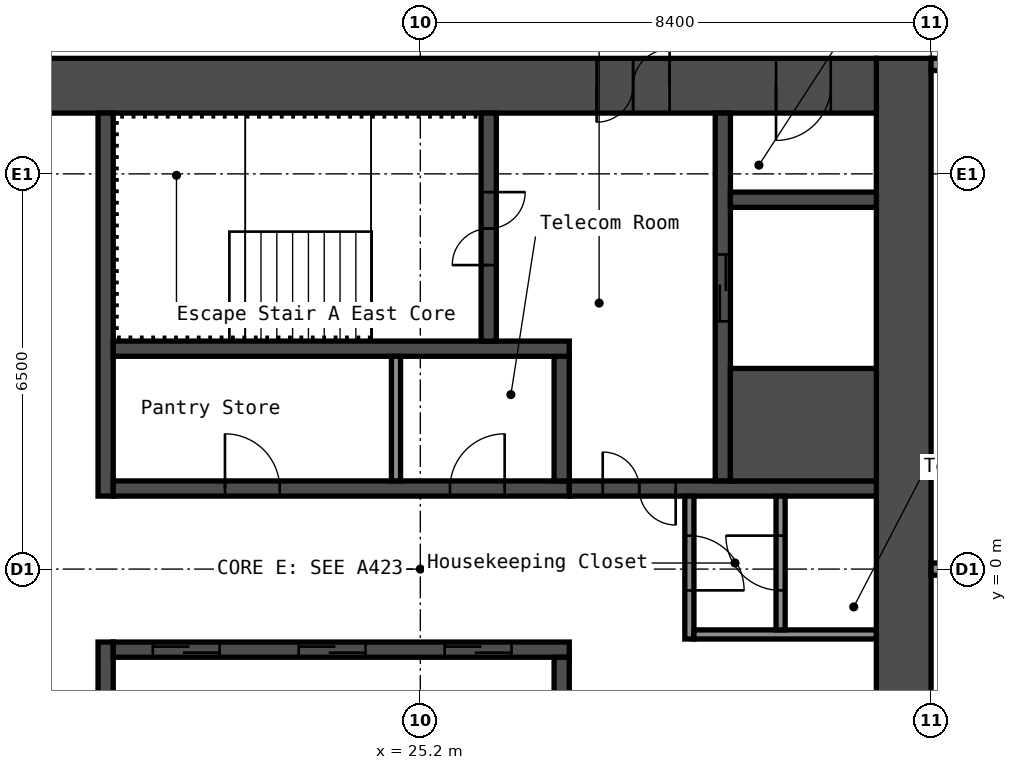
"""IFC4 building model, lengths in metres.
Left out: names, types, materials, properties, quantities, classifications, styles, units other than length and angle.
Written with IfcOpenShell. Run it as: python <this file> out.ifc"""

import sys

from ifc_helpers import new_model, si_unit, direction, frame, frame_2d, origin, place, context, subcontext, project, spatial, rectangle, extrude, element, fill, save


model = new_model("IFC4")
c1 = context("Model", 3, precision=1e-05, world=origin(), true_north=direction((0.0, 1.0)))
c2 = subcontext(c1, "Body", "Model", "MODEL_VIEW")
j1 = project(units=[si_unit("LENGTHUNIT", "METRE"), si_unit("PLANEANGLEUNIT", "RADIAN")], contexts=[c1])
p1 = place(None, origin())
s1 = spatial("IfcSite", under=j1, at=p1, CompositionType="ELEMENT")
p2 = place(p1, origin())
s2 = spatial("IfcBuilding", under=s1, at=p2, CompositionType="ELEMENT")
p3 = place(p2, frame((0.0, 0.0, 156.6)))
s3 = spatial("IfcBuildingStorey", under=s2, at=p3, CompositionType="ELEMENT", Elevation=156.6)
p4 = place(p3, frame((33.15, -8.4, 0.0), z_axis=(0.0, 0.0, 1.0), x_axis=(0.0, 1.0, 0.0)))
e1 = element("IfcWall", 1, at=p4, inside=s3, PredefinedType="SHEAR", context=c2, shape_type="SweptSolid", body=[
    extrude(rectangle(XDim=16.8, YDim=0.9, at=frame_2d((8.4, 0.0))), origin(), (0.0, 0.0, 1.0), 2.75),
])
p5 = place(p3, frame((17.7, 7.95, 0.0), z_axis=(0.0, 0.0, 1.0), x_axis=(1.0, 0.0, 0.0)))
e2 = element("IfcWall", 2, at=p5, inside=s3, PredefinedType="SHEAR", context=c2, shape_type="SweptSolid", body=[
    extrude(rectangle(XDim=15.0, YDim=0.9, at=frame_2d((7.5, 0.0))), origin(), (0.0, 0.0, 1.0), 2.75),
])
p6 = place(p5, frame((10.4, 0.0, 0.0)))
e3 = element("IfcOpeningElement", 3, at=p6, cuts=e2, PredefinedType="OPENING", context=c2, shape_type="SweptSolid", body=[
    extrude(rectangle(XDim=1.2, YDim=2.1, at=frame_2d((0.6, 1.05))), frame((0.0, 0.46, 0.0), z_axis=(0.0, -1.0, 0.0), x_axis=(1.0, 0.0, 0.0)), (0.0, 0.0, 1.0), 0.92),
])
p7 = place(p5, frame((13.35, 0.0, 0.0)))
e4 = element("IfcOpeningElement", 4, at=p7, cuts=e2, PredefinedType="OPENING", context=c2, shape_type="SweptSolid", body=[
    extrude(rectangle(XDim=0.9, YDim=2.1, at=frame_2d((0.45, 1.05))), frame((0.0, 0.46, 0.0), z_axis=(0.0, -1.0, 0.0), x_axis=(1.0, 0.0, 0.0)), (0.0, 0.0, 1.0), 0.92),
])
p8 = place(p3, frame((20.025, 1.2, 0.0), z_axis=(0.0, 0.0, 1.0), x_axis=(0.0, 1.0, 0.0)))
e5 = element("IfcWall", 5, at=p8, inside=s3, PredefinedType="SHEAR", context=c2, shape_type="SweptSolid", body=[
    extrude(rectangle(XDim=6.3, YDim=0.25, at=frame_2d((3.15, 0.0))), origin(), (0.0, 0.0, 1.0), 2.75),
])
p9 = place(p3, frame((20.025, -7.5, 0.0), z_axis=(0.0, 0.0, 1.0), x_axis=(0.0, 1.0, 0.0)))
e6 = element("IfcWall", 6, at=p9, inside=s3, PredefinedType="SHEAR", context=c2, shape_type="SweptSolid", body=[
    extrude(rectangle(XDim=6.3, YDim=0.25, at=frame_2d((3.15, 0.0))), origin(), (0.0, 0.0, 1.0), 2.75),
])
p10 = place(p9, frame((2.4, 0.0, 0.0)))
e7 = element("IfcOpeningElement", 7, at=p10, cuts=e6, PredefinedType="OPENING", context=c2, shape_type="SweptSolid", body=[
    extrude(rectangle(XDim=1.0, YDim=2.1, at=frame_2d((0.5, 1.05))), frame((0.0, 0.135, 0.0), z_axis=(0.0, -1.0, 0.0), x_axis=(1.0, 0.0, 0.0)), (0.0, 0.0, 1.0), 0.27),
])
p11 = place(p3, frame((20.15, 1.325, 0.0), z_axis=(0.0, 0.0, 1.0), x_axis=(1.0, 0.0, 0.0)))
e8 = element("IfcWall", 8, at=p11, inside=s3, PredefinedType="SHEAR", context=c2, shape_type="SweptSolid", body=[
    extrude(rectangle(XDim=7.5, YDim=0.25, at=frame_2d((3.75, 0.0))), origin(), (0.0, 0.0, 1.0), 2.75),
])
p12 = place(p11, frame((1.837, 0.0, 0.0)))
e9 = element("IfcOpeningElement", 9, at=p12, cuts=e8, PredefinedType="OPENING", context=c2, shape_type="SweptSolid", body=[
    extrude(rectangle(XDim=0.9, YDim=2.1, at=frame_2d((0.45, 1.05))), frame((0.0, 0.135, 0.0), z_axis=(0.0, -1.0, 0.0), x_axis=(1.0, 0.0, 0.0)), (0.0, 0.0, 1.0), 0.27),
])
p13 = place(p11, frame((5.538, 0.0, 0.0)))
e10 = element("IfcOpeningElement", 10, at=p13, cuts=e8, PredefinedType="OPENING", context=c2, shape_type="SweptSolid", body=[
    extrude(rectangle(XDim=0.9, YDim=2.1, at=frame_2d((0.45, 1.05))), frame((0.0, 0.135, 0.0), z_axis=(0.0, -1.0, 0.0), x_axis=(1.0, 0.0, 0.0)), (0.0, 0.0, 1.0), 0.27),
])
p14 = place(p3, frame((27.525, 1.45, 0.0), z_axis=(0.0, 0.0, 1.0), x_axis=(0.0, 1.0, 0.0)))
e11 = element("IfcWall", 11, at=p14, inside=s3, PredefinedType="SHEAR", context=c2, shape_type="SweptSolid", body=[
    extrude(rectangle(XDim=2.05, YDim=0.25, at=frame_2d((1.025, 0.0))), origin(), (0.0, 0.0, 1.0), 2.75),
])
p15 = place(p3, frame((20.15, 3.625, 0.0), z_axis=(0.0, 0.0, 1.0), x_axis=(1.0, 0.0, 0.0)))
e12 = element("IfcWall", 12, at=p15, inside=s3, PredefinedType="SHEAR", context=c2, shape_type="SweptSolid", body=[
    extrude(rectangle(XDim=7.5, YDim=0.25, at=frame_2d((3.75, 0.0))), origin(), (0.0, 0.0, 1.0), 2.75),
])
p16 = place(p3, frame((26.325, 3.75, 0.0), z_axis=(0.0, 0.0, 1.0), x_axis=(0.0, 1.0, 0.0)))
e13 = element("IfcWall", 13, at=p16, inside=s3, PredefinedType="SHEAR", context=c2, shape_type="SweptSolid", body=[
    extrude(rectangle(XDim=3.75, YDim=0.25, at=frame_2d((1.875, 0.0))), origin(), (0.0, 0.0, 1.0), 2.75),
])
p17 = place(p16, frame((1.25, 0.0, 0.0)))
e14 = element("IfcOpeningElement", 14, at=p17, cuts=e13, PredefinedType="OPENING", context=c2, shape_type="SweptSolid", body=[
    extrude(rectangle(XDim=1.2, YDim=2.1, at=frame_2d((0.6, 1.05))), frame((0.0, 0.135, 0.0), z_axis=(0.0, -1.0, 0.0), x_axis=(1.0, 0.0, 0.0)), (0.0, 0.0, 1.0), 0.27),
])
p18 = place(p3, frame((27.65, 1.325, 0.0), z_axis=(0.0, 0.0, 1.0), x_axis=(1.0, 0.0, 0.0)))
e15 = element("IfcWall", 15, at=p18, inside=s3, PredefinedType="SHEAR", context=c2, shape_type="SweptSolid", body=[
    extrude(rectangle(XDim=5.05, YDim=0.25, at=frame_2d((2.525, 0.0))), origin(), (0.0, 0.0, 1.0), 2.75),
])
p19 = place(p18, frame((0.55, 0.0, 0.0)))
e16 = element("IfcOpeningElement", 16, at=p19, cuts=e15, PredefinedType="OPENING", context=c2, shape_type="SweptSolid", body=[
    extrude(rectangle(XDim=1.2, YDim=2.1, at=frame_2d((0.6, 1.05))), frame((0.0, 0.135, 0.0), z_axis=(0.0, -1.0, 0.0), x_axis=(1.0, 0.0, 0.0)), (0.0, 0.0, 1.0), 0.27),
])
p20 = place(p3, frame((30.175, 1.45, 0.0), z_axis=(0.0, 0.0, 1.0), x_axis=(0.0, 1.0, 0.0)))
e17 = element("IfcWall", 17, at=p20, inside=s3, PredefinedType="SHEAR", context=c2, shape_type="SweptSolid", body=[
    extrude(rectangle(XDim=6.05, YDim=0.25, at=frame_2d((3.025, 0.0))), origin(), (0.0, 0.0, 1.0), 2.75),
])
p21 = place(p20, frame((2.625, 0.0, 0.0)))
e18 = element("IfcOpeningElement", 18, at=p21, cuts=e17, PredefinedType="OPENING", context=c2, shape_type="SweptSolid", body=[
    extrude(rectangle(XDim=1.1, YDim=2.1, at=frame_2d((0.55, 1.05))), frame((0.0, 0.135, 0.0), z_axis=(0.0, -1.0, 0.0), x_axis=(1.0, 0.0, 0.0)), (0.0, 0.0, 1.0), 0.27),
])
p22 = place(p3, frame((30.3, 2.375, 0.0), z_axis=(0.0, 0.0, 1.0), x_axis=(1.0, 0.0, 0.0)))
e19 = element("IfcWall", 19, at=p22, inside=s3, PredefinedType="SHEAR", context=c2, shape_type="SweptSolid", body=[
    extrude(rectangle(XDim=2.4, YDim=1.85, at=frame_2d((1.2, 0.0))), origin(), (0.0, 0.0, 1.0), 2.75),
])
p23 = place(p3, frame((30.3, 6.075, 0.0), z_axis=(0.0, 0.0, 1.0), x_axis=(1.0, 0.0, 0.0)))
e20 = element("IfcWall", 20, at=p23, inside=s3, PredefinedType="SHEAR", context=c2, shape_type="SweptSolid", body=[
    extrude(rectangle(XDim=2.4, YDim=0.25, at=frame_2d((1.2, 0.0))), origin(), (0.0, 0.0, 1.0), 2.75),
])
p24 = place(p3, frame((20.15, -1.325, 0.0), z_axis=(0.0, 0.0, 1.0), x_axis=(1.0, 0.0, 0.0)))
e21 = element("IfcWall", 21, at=p24, inside=s3, PredefinedType="SHEAR", context=c2, shape_type="SweptSolid", body=[
    extrude(rectangle(XDim=7.5, YDim=0.25, at=frame_2d((3.75, 0.0))), origin(), (0.0, 0.0, 1.0), 2.75),
])
p25 = place(p24, frame((0.65, 0.0, 0.0)))
e22 = element("IfcOpeningElement", 22, at=p25, cuts=e21, PredefinedType="OPENING", context=c2, shape_type="SweptSolid", body=[
    extrude(rectangle(XDim=1.1, YDim=2.1, at=frame_2d((0.55, 1.05))), frame((0.0, 0.135, 0.0), z_axis=(0.0, -1.0, 0.0), x_axis=(1.0, 0.0, 0.0)), (0.0, 0.0, 1.0), 0.27),
])
p26 = place(p24, frame((3.05, 0.0, 0.0)))
e23 = element("IfcOpeningElement", 23, at=p26, cuts=e21, PredefinedType="OPENING", context=c2, shape_type="SweptSolid", body=[
    extrude(rectangle(XDim=1.1, YDim=2.1, at=frame_2d((0.55, 1.05))), frame((0.0, 0.135, 0.0), z_axis=(0.0, -1.0, 0.0), x_axis=(1.0, 0.0, 0.0)), (0.0, 0.0, 1.0), 0.27),
])
p27 = place(p24, frame((5.45, 0.0, 0.0)))
e24 = element("IfcOpeningElement", 24, at=p27, cuts=e21, PredefinedType="OPENING", context=c2, shape_type="SweptSolid", body=[
    extrude(rectangle(XDim=1.1, YDim=2.1, at=frame_2d((0.55, 1.05))), frame((0.0, 0.135, 0.0), z_axis=(0.0, -1.0, 0.0), x_axis=(1.0, 0.0, 0.0)), (0.0, 0.0, 1.0), 0.27),
])
p28 = place(p3, frame((27.525, -3.5, 0.0), z_axis=(0.0, 0.0, 1.0), x_axis=(0.0, 1.0, 0.0)))
e25 = element("IfcWall", 25, at=p28, inside=s3, PredefinedType="SHEAR", context=c2, shape_type="SweptSolid", body=[
    extrude(rectangle(XDim=2.05, YDim=0.25, at=frame_2d((1.025, 0.0))), origin(), (0.0, 0.0, 1.0), 2.75),
])
p29 = place(p3, frame((29.625, -1.15, 0.0), z_axis=(0.0, 0.0, 1.0), x_axis=(0.0, 1.0, 0.0)))
e26 = element("IfcWall", 26, at=p29, inside=s3, PredefinedType="PARTITIONING", context=c2, shape_type="SweptSolid", body=[
    extrude(rectangle(XDim=2.35, YDim=0.15, at=frame_2d((1.175, 0.0))), origin(), (0.0, 0.0, 1.0), 2.75),
])
p30 = place(p29, frame((0.8, 0.0, 0.0)))
e27 = element("IfcOpeningElement", 27, at=p30, cuts=e26, PredefinedType="OPENING", context=c2, shape_type="SweptSolid", body=[
    extrude(rectangle(XDim=0.9, YDim=2.1, at=frame_2d((0.45, 1.05))), frame((0.0, 0.085, 0.0), z_axis=(0.0, -1.0, 0.0), x_axis=(1.0, 0.0, 0.0)), (0.0, 0.0, 1.0), 0.17),
])
p31 = place(p3, frame((29.7, -1.075, 0.0), z_axis=(0.0, 0.0, 1.0), x_axis=(1.0, 0.0, 0.0)))
e28 = element("IfcWall", 28, at=p31, inside=s3, PredefinedType="PARTITIONING", context=c2, shape_type="SweptSolid", body=[
    extrude(rectangle(XDim=3.0, YDim=0.15, at=frame_2d((1.5, 0.0))), origin(), (0.0, 0.0, 1.0), 2.75),
])
p32 = place(p3, frame((31.125, -1.0, 0.0), z_axis=(0.0, 0.0, 1.0), x_axis=(0.0, 1.0, 0.0)))
e29 = element("IfcWall", 29, at=p32, inside=s3, PredefinedType="PARTITIONING", context=c2, shape_type="SweptSolid", body=[
    extrude(rectangle(XDim=2.2, YDim=0.15, at=frame_2d((1.1, 0.0))), origin(), (0.0, 0.0, 1.0), 2.75),
])
p33 = place(p32, frame((0.65, 0.0, 0.0)))
e30 = element("IfcOpeningElement", 30, at=p33, cuts=e29, PredefinedType="OPENING", context=c2, shape_type="SweptSolid", body=[
    extrude(rectangle(XDim=0.9, YDim=2.1, at=frame_2d((0.45, 1.05))), frame((0.0, 0.085, 0.0), z_axis=(0.0, -1.0, 0.0), x_axis=(1.0, 0.0, 0.0)), (0.0, 0.0, 1.0), 0.17),
])
p34 = place(p3, frame((24.8, 1.45, 0.0), z_axis=(0.0, 0.0, 1.0), x_axis=(0.0, 1.0, 0.0)))
e31 = element("IfcWall", 31, at=p34, inside=s3, PredefinedType="PARTITIONING", context=c2, shape_type="SweptSolid", body=[
    extrude(rectangle(XDim=2.05, YDim=0.15, at=frame_2d((1.025, 0.0))), origin(), (0.0, 0.0, 1.0), 2.75),
])
p35 = place(p3, frame((33.6, 0.0, 0.0), z_axis=(0.0, 0.0, 1.0), x_axis=(1.0, 0.0, 0.0)))
e32 = element("IfcWall", 32, at=p35, inside=s3, PredefinedType="PARTITIONING", context=c2, shape_type="SweptSolid", body=[
    extrude(rectangle(XDim=6.5, YDim=0.2, at=frame_2d((3.25, 0.0))), origin(), (0.0, 0.0, 1.0), 2.75),
])
p36 = place(p3, frame((33.6, 8.3, 0.0), z_axis=(0.0, 0.0, 1.0), x_axis=(1.0, 0.0, 0.0)))
e33 = element("IfcWall", 33, at=p36, inside=s3, PredefinedType="PARTITIONING", context=c2, shape_type="SweptSolid", body=[
    extrude(rectangle(XDim=6.6, YDim=0.2, at=frame_2d((3.3, 0.0))), origin(), (0.0, 0.0, 1.0), 2.75),
])
p37 = place(p36, frame((1.33, 0.0, 0.0)))
e34 = element("IfcOpeningElement", 34, at=p37, cuts=e33, PredefinedType="OPENING", context=c2, shape_type="SweptSolid", body=[
    extrude(rectangle(XDim=0.9, YDim=2.1, at=frame_2d((0.45, 1.05))), frame((0.0, 0.11, 0.0), z_axis=(0.0, -1.0, 0.0), x_axis=(1.0, 0.0, 0.0)), (0.0, 0.0, 1.0), 0.22),
])
p38 = place(p36, frame((4.63, 0.0, 0.0)))
e35 = element("IfcOpeningElement", 35, at=p38, cuts=e33, PredefinedType="OPENING", context=c2, shape_type="SweptSolid", body=[
    extrude(rectangle(XDim=0.9, YDim=2.1, at=frame_2d((0.45, 1.05))), frame((0.0, 0.11, 0.0), z_axis=(0.0, -1.0, 0.0), x_axis=(1.0, 0.0, 0.0)), (0.0, 0.0, 1.0), 0.22),
])
p39 = place(p6, origin())
e36 = element("IfcDoor", 36, at=p39, inside=s3, OperationType="DOUBLE_DOOR_SINGLE_SWING", PredefinedType="DOOR", context=c2, shape_type="SweptSolid", body=[
    extrude(rectangle(XDim=1.2, YDim=2.1, at=frame_2d((0.6, 1.05))), frame((0.0, 0.025, 0.0), z_axis=(0.0, -1.0, 0.0), x_axis=(1.0, 0.0, 0.0)), (0.0, 0.0, 1.0), 0.05),
])
fill(e3, e36)
p40 = place(p7, origin())
e37 = element("IfcDoor", 37, at=p40, inside=s3, OperationType="SINGLE_SWING_LEFT", PredefinedType="DOOR", context=c2, shape_type="SweptSolid", body=[
    extrude(rectangle(XDim=0.9, YDim=2.1, at=frame_2d((0.45, 1.05))), frame((0.0, 0.025, 0.0), z_axis=(0.0, -1.0, 0.0), x_axis=(1.0, 0.0, 0.0)), (0.0, 0.0, 1.0), 0.05),
])
fill(e4, e37)
p41 = place(p17, origin())
e38 = element("IfcDoor", 38, at=p41, inside=s3, OperationType="DOUBLE_DOOR_SINGLE_SWING", PredefinedType="DOOR", context=c2, shape_type="SweptSolid", body=[
    extrude(rectangle(XDim=1.2, YDim=2.1, at=frame_2d((0.6, 1.05))), frame((0.0, 0.025, 0.0), z_axis=(0.0, -1.0, 0.0), x_axis=(1.0, 0.0, 0.0)), (0.0, 0.0, 1.0), 0.05),
])
fill(e14, e38)
p42 = place(p19, origin())
e39 = element("IfcDoor", 39, at=p42, inside=s3, OperationType="DOUBLE_DOOR_SINGLE_SWING", PredefinedType="DOOR", context=c2, shape_type="SweptSolid", body=[
    extrude(rectangle(XDim=1.2, YDim=2.1, at=frame_2d((0.6, 1.05))), frame((0.0, 0.025, 0.0), z_axis=(0.0, -1.0, 0.0), x_axis=(1.0, 0.0, 0.0)), (0.0, 0.0, 1.0), 0.05),
])
fill(e16, e39)
p43 = place(p30, origin())
e40 = element("IfcDoor", 40, at=p43, inside=s3, OperationType="SINGLE_SWING_LEFT", PredefinedType="DOOR", context=c2, shape_type="SweptSolid", body=[
    extrude(rectangle(XDim=0.9, YDim=2.1, at=frame_2d((0.45, 1.05))), frame((0.0, 0.025, 0.0), z_axis=(0.0, -1.0, 0.0), x_axis=(1.0, 0.0, 0.0)), (0.0, 0.0, 1.0), 0.05),
])
fill(e27, e40)
p44 = place(p33, origin())
e41 = element("IfcDoor", 41, at=p44, inside=s3, OperationType="SINGLE_SWING_LEFT", PredefinedType="DOOR", context=c2, shape_type="SweptSolid", body=[
    extrude(rectangle(XDim=0.9, YDim=2.1, at=frame_2d((0.45, 1.05))), frame((0.0, 0.025, 0.0), z_axis=(0.0, -1.0, 0.0), x_axis=(1.0, 0.0, 0.0)), (0.0, 0.0, 1.0), 0.05),
])
fill(e30, e41)
p45 = place(p12, origin())
e42 = element("IfcDoor", 42, at=p45, inside=s3, OperationType="SINGLE_SWING_RIGHT", PredefinedType="DOOR", context=c2, shape_type="SweptSolid", body=[
    extrude(rectangle(XDim=0.9, YDim=2.1, at=frame_2d((0.45, 1.05))), frame((0.0, 0.025, 0.0), z_axis=(0.0, -1.0, 0.0), x_axis=(1.0, 0.0, 0.0)), (0.0, 0.0, 1.0), 0.05),
])
fill(e9, e42)
p46 = place(p13, origin())
e43 = element("IfcDoor", 43, at=p46, inside=s3, OperationType="SINGLE_SWING_LEFT", PredefinedType="DOOR", context=c2, shape_type="SweptSolid", body=[
    extrude(rectangle(XDim=0.9, YDim=2.1, at=frame_2d((0.45, 1.05))), frame((0.0, 0.025, 0.0), z_axis=(0.0, -1.0, 0.0), x_axis=(1.0, 0.0, 0.0)), (0.0, 0.0, 1.0), 0.05),
])
fill(e10, e43)
p47 = place(p25, origin())
e44 = element("IfcDoor", 44, at=p47, inside=s3, OperationType="DOUBLE_DOOR_SLIDING", PredefinedType="DOOR", context=c2, shape_type="SweptSolid", body=[
    extrude(rectangle(XDim=1.1, YDim=2.1, at=frame_2d((0.55, 1.05))), frame((0.0, 0.025, 0.0), z_axis=(0.0, -1.0, 0.0), x_axis=(1.0, 0.0, 0.0)), (0.0, 0.0, 1.0), 0.05),
])
fill(e22, e44)
p48 = place(p26, origin())
e45 = element("IfcDoor", 45, at=p48, inside=s3, OperationType="DOUBLE_DOOR_SLIDING", PredefinedType="DOOR", context=c2, shape_type="SweptSolid", body=[
    extrude(rectangle(XDim=1.1, YDim=2.1, at=frame_2d((0.55, 1.05))), frame((0.0, 0.025, 0.0), z_axis=(0.0, -1.0, 0.0), x_axis=(1.0, 0.0, 0.0)), (0.0, 0.0, 1.0), 0.05),
])
fill(e23, e45)
p49 = place(p27, origin())
e46 = element("IfcDoor", 46, at=p49, inside=s3, OperationType="DOUBLE_DOOR_SLIDING", PredefinedType="DOOR", context=c2, shape_type="SweptSolid", body=[
    extrude(rectangle(XDim=1.1, YDim=2.1, at=frame_2d((0.55, 1.05))), frame((0.0, 0.025, 0.0), z_axis=(0.0, -1.0, 0.0), x_axis=(1.0, 0.0, 0.0)), (0.0, 0.0, 1.0), 0.05),
])
fill(e24, e46)
p50 = place(p21, origin())
e47 = element("IfcDoor", 47, at=p50, inside=s3, OperationType="DOUBLE_DOOR_SLIDING", PredefinedType="DOOR", context=c2, shape_type="SweptSolid", body=[
    extrude(rectangle(XDim=1.1, YDim=2.1, at=frame_2d((0.55, 1.05))), frame((0.0, 0.025, 0.0), z_axis=(0.0, -1.0, 0.0), x_axis=(1.0, 0.0, 0.0)), (0.0, 0.0, 1.0), 0.05),
])
fill(e18, e47)
save(model, sys.argv[1])
